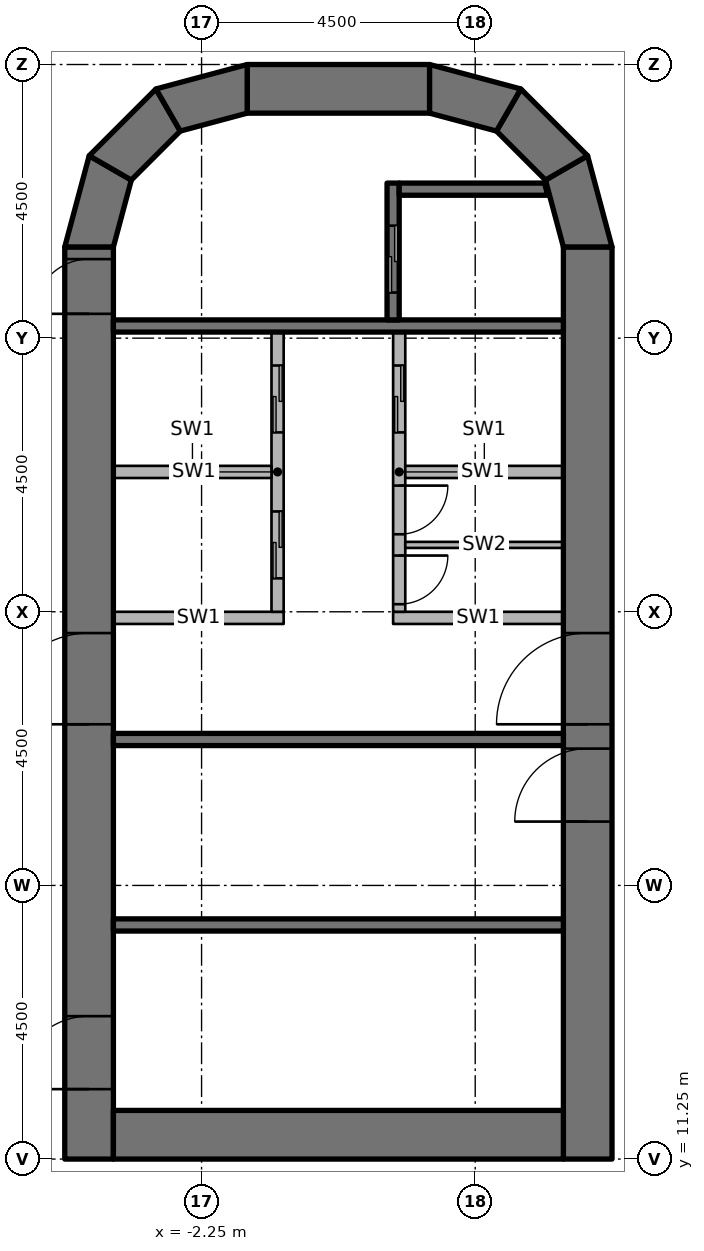
"""IFC4 building model, lengths in metres.
Left out: names, types, materials, properties, quantities, classifications, styles, units other than length and angle.
Written with IfcOpenShell. Run it as: python <this file> out.ifc"""

import sys

from ifc_helpers import new_model, si_unit, direction, frame, frame_2d, origin, place, context, subcontext, project, spatial, polyline, rectangle, outline, extrude, element, fill, save


model = new_model("IFC4")
c1 = context("Model", 3, precision=1e-05, world=origin(), true_north=direction((0.0, 1.0)))
c2 = subcontext(c1, "Body", "Model", "MODEL_VIEW")
j1 = project(units=[si_unit("LENGTHUNIT", "METRE"), si_unit("PLANEANGLEUNIT", "RADIAN")], contexts=[c1])
p1 = place(None, origin())
s1 = spatial("IfcSite", under=j1, at=p1, CompositionType="ELEMENT")
p2 = place(p1, origin())
s2 = spatial("IfcBuilding", under=s1, at=p2, CompositionType="ELEMENT")
p3 = place(p2, frame((0.0, 0.0, 136.0)))
s3 = spatial("IfcBuildingStorey", under=s2, at=p3, CompositionType="ELEMENT", Elevation=136.0)
p4 = place(p3, frame((-4.1, 11.25, 0.0), z_axis=(0.0, 0.0, 1.0), x_axis=(0.0, 1.0, 0.0)))
e1 = element("IfcWall", 1, at=p4, inside=s3, PredefinedType="SHEAR", context=c2, shape_type="SweptSolid", body=[
    extrude(rectangle(XDim=15.0, YDim=0.8, at=frame_2d((7.5, 0.0))), origin(), (0.0, 0.0, 1.0), 5.0),
])
p5 = place(p4, frame((7.15, 0.0, 0.0)))
e2 = element("IfcOpeningElement", 2, at=p5, cuts=e1, PredefinedType="OPENING", context=c2, shape_type="SweptSolid", body=[
    extrude(rectangle(XDim=1.5, YDim=2.3, at=frame_2d((0.75, 1.15))), frame((0.0, 0.41, 0.0), z_axis=(0.0, -1.0, 0.0), x_axis=(1.0, 0.0, 0.0)), (0.0, 0.0, 1.0), 0.82),
])
p6 = place(p4, frame((13.9, 0.0, 0.0)))
e3 = element("IfcOpeningElement", 3, at=p6, cuts=e1, PredefinedType="OPENING", context=c2, shape_type="SweptSolid", body=[
    extrude(rectangle(XDim=0.9, YDim=2.1, at=frame_2d((0.45, 1.05))), frame((0.0, 0.41, 0.0), z_axis=(0.0, -1.0, 0.0), x_axis=(1.0, 0.0, 0.0)), (0.0, 0.0, 1.0), 0.82),
])
p7 = place(p4, frame((1.15, 0.0, 0.0)))
e4 = element("IfcOpeningElement", 4, at=p7, cuts=e1, PredefinedType="OPENING", context=c2, shape_type="SweptSolid", body=[
    extrude(rectangle(XDim=1.2, YDim=2.1, at=frame_2d((0.6, 1.05))), frame((0.0, 0.41, 0.0), z_axis=(0.0, -1.0, 0.0), x_axis=(1.0, 0.0, 0.0)), (0.0, 0.0, 1.0), 0.82),
])
p8 = place(p3, frame((4.1, 11.25, 0.0), z_axis=(0.0, 0.0, 1.0), x_axis=(0.0, 1.0, 0.0)))
e5 = element("IfcWall", 5, at=p8, inside=s3, PredefinedType="SHEAR", context=c2, shape_type="SweptSolid", body=[
    extrude(rectangle(XDim=15.0, YDim=0.8, at=frame_2d((7.5, 0.0))), origin(), (0.0, 0.0, 1.0), 5.0),
])
p9 = place(p8, frame((7.15, 0.0, 0.0)))
e6 = element("IfcOpeningElement", 6, at=p9, cuts=e5, PredefinedType="OPENING", context=c2, shape_type="SweptSolid", body=[
    extrude(rectangle(XDim=1.5, YDim=2.3, at=frame_2d((0.75, 1.15))), frame((0.0, 0.41, 0.0), z_axis=(0.0, -1.0, 0.0), x_axis=(1.0, 0.0, 0.0)), (0.0, 0.0, 1.0), 0.82),
])
p10 = place(p8, frame((5.55, 0.0, 0.0)))
e7 = element("IfcOpeningElement", 7, at=p10, cuts=e5, PredefinedType="OPENING", context=c2, shape_type="SweptSolid", body=[
    extrude(rectangle(XDim=1.2, YDim=2.1, at=frame_2d((0.6, 1.05))), frame((0.0, 0.41, 0.0), z_axis=(0.0, -1.0, 0.0), x_axis=(1.0, 0.0, 0.0)), (0.0, 0.0, 1.0), 0.82),
])
p11 = place(p3, frame((-3.7, 11.65, 0.0), z_axis=(0.0, 0.0, 1.0), x_axis=(1.0, 0.0, 0.0)))
e8 = element("IfcWall", 8, at=p11, inside=s3, PredefinedType="SHEAR", context=c2, shape_type="SweptSolid", body=[
    extrude(rectangle(XDim=7.4, YDim=0.8, at=frame_2d((3.7, 0.0))), origin(), (0.0, 0.0, 1.0), 5.0),
])
p12 = place(p3, frame((-1.5, 28.85, 0.0), z_axis=(0.0, 0.0, 1.0), x_axis=(1.0, 0.0, 0.0)))
e9 = element("IfcWall", 9, at=p12, inside=s3, PredefinedType="SHEAR", context=c2, shape_type="SweptSolid", body=[
    extrude(rectangle(XDim=3.0, YDim=0.8, at=frame_2d((1.5, 0.0))), origin(), (0.0, 0.0, 1.0), 5.0),
])
p13 = place(p3, origin())
e10 = element("IfcWall", 10, at=p13, inside=s3, PredefinedType="SHEAR", context=c2, shape_type="SweptSolid", body=[
    extrude(outline(polyline([(-4.5, 26.25), (-4.098, 27.75), (-3.405, 27.35), (-3.7, 26.25), (-4.5, 26.25)])), origin(), (0.0, 0.0, 1.0), 5.0),
])
p14 = place(p3, origin())
e11 = element("IfcWall", 11, at=p14, inside=s3, PredefinedType="SHEAR", context=c2, shape_type="SweptSolid", body=[
    extrude(outline(polyline([(-4.098, 27.75), (-3.0, 28.848), (-2.6, 28.155), (-3.405, 27.35), (-4.098, 27.75)])), origin(), (0.0, 0.0, 1.0), 5.0),
])
p15 = place(p3, origin())
e12 = element("IfcWall", 12, at=p15, inside=s3, PredefinedType="SHEAR", context=c2, shape_type="SweptSolid", body=[
    extrude(outline(polyline([(-3.0, 28.848), (-1.5, 29.25), (-1.5, 28.45), (-2.6, 28.155), (-3.0, 28.848)])), origin(), (0.0, 0.0, 1.0), 5.0),
])
p16 = place(p3, origin())
e13 = element("IfcWall", 13, at=p16, inside=s3, PredefinedType="SHEAR", context=c2, shape_type="SweptSolid", body=[
    extrude(outline(polyline([(4.5, 26.25), (4.098, 27.75), (3.405, 27.35), (3.7, 26.25), (4.5, 26.25)])), origin(), (0.0, 0.0, 1.0), 5.0),
])
p17 = place(p3, origin())
e14 = element("IfcWall", 14, at=p17, inside=s3, PredefinedType="SHEAR", context=c2, shape_type="SweptSolid", body=[
    extrude(outline(polyline([(4.098, 27.75), (3.0, 28.848), (2.6, 28.155), (3.405, 27.35), (4.098, 27.75)])), origin(), (0.0, 0.0, 1.0), 5.0),
])
p18 = place(p3, origin())
e15 = element("IfcWall", 15, at=p18, inside=s3, PredefinedType="SHEAR", context=c2, shape_type="SweptSolid", body=[
    extrude(outline(polyline([(3.0, 28.848), (1.5, 29.25), (1.5, 28.45), (2.6, 28.155), (3.0, 28.848)])), origin(), (0.0, 0.0, 1.0), 5.0),
])
p19 = place(p3, origin())
e16 = element("IfcWall", 16, at=p19, inside=s3, PredefinedType="SOLIDWALL", context=c2, shape_type="SweptSolid", body=[
    extrude(outline(polyline([(6.129, 29.24), (4.49, 30.879), (4.386, 30.7), (5.95, 29.136), (6.129, 29.24)])), origin(), (0.0, 0.0, 1.0), 4.85),
])
p20 = place(p3, origin())
e17 = element("IfcWall", 17, at=p20, inside=s3, PredefinedType="SOLIDWALL", context=c2, shape_type="SweptSolid", body=[
    extrude(outline(polyline([(-4.49, 30.879), (-6.129, 29.24), (-5.95, 29.136), (-4.386, 30.7), (-4.49, 30.879)])), origin(), (0.0, 0.0, 1.0), 4.85),
])
p21 = place(p3, frame((-3.7, 24.95, 0.0), z_axis=(0.0, 0.0, 1.0), x_axis=(1.0, 0.0, 0.0)))
e18 = element("IfcWall", 18, at=p21, inside=s3, PredefinedType="SHEAR", context=c2, shape_type="SweptSolid", body=[
    extrude(rectangle(XDim=7.4, YDim=0.2, at=frame_2d((3.7, 0.0))), origin(), (0.0, 0.0, 1.0), 4.85),
])
p22 = place(p3, frame((0.9, 27.3, 0.0), z_axis=(0.0, 0.0, 1.0), x_axis=(0.0, -1.0, 0.0)))
e19 = element("IfcWall", 19, at=p22, inside=s3, PredefinedType="SHEAR", context=c2, shape_type="SweptSolid", body=[
    extrude(rectangle(XDim=2.25, YDim=0.2, at=frame_2d((1.125, 0.0))), origin(), (0.0, 0.0, 1.0), 4.85),
])
p23 = place(p22, frame((0.7, 0.0, 0.0)))
e20 = element("IfcOpeningElement", 20, at=p23, cuts=e19, PredefinedType="OPENING", context=c2, shape_type="SweptSolid", body=[
    extrude(rectangle(XDim=1.1, YDim=2.3, at=frame_2d((0.55, 1.15))), frame((0.0, 0.11, 0.0), z_axis=(0.0, -1.0, 0.0), x_axis=(1.0, 0.0, 0.0)), (0.0, 0.0, 1.0), 0.22),
])
p24 = place(p3, origin())
e21 = element("IfcWall", 21, at=p24, inside=s3, PredefinedType="SHEAR", context=c2, shape_type="SweptSolid", body=[
    extrude(outline(polyline([(1.0, 27.1), (3.444, 27.1), (3.39, 27.3), (1.0, 27.3), (1.0, 27.1)])), origin(), (0.0, 0.0, 1.0), 4.85),
])
for number, where, z_axis, x_axis in (
    (22, (-3.7, 18.15, 0.0), (0.0, 0.0, 1.0), (1.0, 0.0, 0.0)),
    (23, (-3.7, 15.1, 0.0), (0.0, 0.0, 1.0), (1.0, 0.0, 0.0)),
):
    element("IfcWall", number, at=place(p3, frame(where, z_axis=z_axis, x_axis=x_axis)), inside=s3, PredefinedType="SHEAR", context=c2, shape_type="SweptSolid", body=[
        extrude(rectangle(XDim=7.4, YDim=0.2, at=frame_2d((3.7, 0.0))), origin(), (0.0, 0.0, 1.0), 4.85),
    ])
p25 = place(p3, frame((-3.7, 20.15, 0.0), z_axis=(0.0, 0.0, 1.0), x_axis=(1.0, 0.0, 0.0)))
e24 = element("IfcWall", 24, at=p25, inside=s3, PredefinedType="PARTITIONING", context=c2, shape_type="SweptSolid", body=[
    extrude(rectangle(XDim=2.8, YDim=0.2, at=frame_2d((1.4, 0.0))), origin(), (0.0, 0.0, 1.0), 4.85),
])
p26 = place(p3, frame((-1.0, 24.85, 0.0), z_axis=(0.0, 0.0, 1.0), x_axis=(0.0, -1.0, 0.0)))
e25 = element("IfcWall", 25, at=p26, inside=s3, PredefinedType="PARTITIONING", context=c2, shape_type="SweptSolid", body=[
    extrude(rectangle(XDim=4.6, YDim=0.2, at=frame_2d((2.3, 0.0))), origin(), (0.0, 0.0, 1.0), 4.85),
])
p27 = place(p26, frame((0.55, 0.0, 0.0)))
e26 = element("IfcOpeningElement", 26, at=p27, cuts=e25, PredefinedType="OPENING", context=c2, shape_type="SweptSolid", body=[
    extrude(rectangle(XDim=1.1, YDim=2.3, at=frame_2d((0.55, 1.15))), frame((0.0, 0.11, 0.0), z_axis=(0.0, -1.0, 0.0), x_axis=(1.0, 0.0, 0.0)), (0.0, 0.0, 1.0), 0.22),
])
p28 = place(p26, frame((2.95, 0.0, 0.0)))
e27 = element("IfcOpeningElement", 27, at=p28, cuts=e25, PredefinedType="OPENING", context=c2, shape_type="SweptSolid", body=[
    extrude(rectangle(XDim=1.1, YDim=2.3, at=frame_2d((0.55, 1.15))), frame((0.0, 0.11, 0.0), z_axis=(0.0, -1.0, 0.0), x_axis=(1.0, 0.0, 0.0)), (0.0, 0.0, 1.0), 0.22),
])
p29 = place(p3, frame((0.9, 20.15, 0.0), z_axis=(0.0, 0.0, 1.0), x_axis=(1.0, 0.0, 0.0)))
e28 = element("IfcWall", 28, at=p29, inside=s3, PredefinedType="PARTITIONING", context=c2, shape_type="SweptSolid", body=[
    extrude(rectangle(XDim=2.8, YDim=0.2, at=frame_2d((1.4, 0.0))), origin(), (0.0, 0.0, 1.0), 4.85),
])
p30 = place(p3, frame((1.0, 24.85, 0.0), z_axis=(0.0, 0.0, 1.0), x_axis=(0.0, -1.0, 0.0)))
e29 = element("IfcWall", 29, at=p30, inside=s3, PredefinedType="PARTITIONING", context=c2, shape_type="SweptSolid", body=[
    extrude(rectangle(XDim=4.6, YDim=0.2, at=frame_2d((2.3, 0.0))), origin(), (0.0, 0.0, 1.0), 4.85),
])
p31 = place(p30, frame((0.55, 0.0, 0.0)))
e30 = element("IfcOpeningElement", 30, at=p31, cuts=e29, PredefinedType="OPENING", context=c2, shape_type="SweptSolid", body=[
    extrude(rectangle(XDim=1.1, YDim=2.3, at=frame_2d((0.55, 1.15))), frame((0.0, 0.11, 0.0), z_axis=(0.0, -1.0, 0.0), x_axis=(1.0, 0.0, 0.0)), (0.0, 0.0, 1.0), 0.22),
])
p32 = place(p30, frame((2.525, 0.0, 0.0)))
e31 = element("IfcOpeningElement", 31, at=p32, cuts=e29, PredefinedType="OPENING", context=c2, shape_type="SweptSolid", body=[
    extrude(rectangle(XDim=0.8, YDim=2.1, at=frame_2d((0.4, 1.05))), frame((0.0, 0.11, 0.0), z_axis=(0.0, -1.0, 0.0), x_axis=(1.0, 0.0, 0.0)), (0.0, 0.0, 1.0), 0.22),
])
p33 = place(p30, frame((3.675, 0.0, 0.0)))
e32 = element("IfcOpeningElement", 32, at=p33, cuts=e29, PredefinedType="OPENING", context=c2, shape_type="SweptSolid", body=[
    extrude(rectangle(XDim=0.8, YDim=2.1, at=frame_2d((0.4, 1.05))), frame((0.0, 0.11, 0.0), z_axis=(0.0, -1.0, 0.0), x_axis=(1.0, 0.0, 0.0)), (0.0, 0.0, 1.0), 0.22),
])
for number, where, z_axis, x_axis in (
    (33, (-3.7, 22.55, 0.0), (0.0, 0.0, 1.0), (1.0, 0.0, 0.0)),
    (34, (1.1, 22.55, 0.0), (0.0, 0.0, 1.0), (1.0, 0.0, 0.0)),
):
    element("IfcWall", number, at=place(p3, frame(where, z_axis=z_axis, x_axis=x_axis)), inside=s3, PredefinedType="PARTITIONING", context=c2, shape_type="SweptSolid", body=[
        extrude(rectangle(XDim=2.6, YDim=0.2, at=frame_2d((1.3, 0.0))), origin(), (0.0, 0.0, 1.0), 4.85),
    ])
p34 = place(p3, frame((1.1, 21.35, 0.0), z_axis=(0.0, 0.0, 1.0), x_axis=(1.0, 0.0, 0.0)))
e35 = element("IfcWall", 35, at=p34, inside=s3, PredefinedType="PARTITIONING", context=c2, shape_type="SweptSolid", body=[
    extrude(rectangle(XDim=2.6, YDim=0.1, at=frame_2d((1.3, 0.0))), origin(), (0.0, 0.0, 1.0), 4.85),
])
p35 = place(p5, origin())
e36 = element("IfcDoor", 36, at=p35, inside=s3, OperationType="DOUBLE_DOOR_SINGLE_SWING", PredefinedType="DOOR", context=c2, shape_type="SweptSolid", body=[
    extrude(rectangle(XDim=1.5, YDim=2.3, at=frame_2d((0.75, 1.15))), frame((0.0, 0.025, 0.0), z_axis=(0.0, -1.0, 0.0), x_axis=(1.0, 0.0, 0.0)), (0.0, 0.0, 1.0), 0.05),
])
fill(e2, e36)
p36 = place(p9, origin())
e37 = element("IfcDoor", 37, at=p36, inside=s3, OperationType="DOUBLE_DOOR_SINGLE_SWING", PredefinedType="DOOR", context=c2, shape_type="SweptSolid", body=[
    extrude(rectangle(XDim=1.5, YDim=2.3, at=frame_2d((0.75, 1.15))), frame((0.0, 0.025, 0.0), z_axis=(0.0, -1.0, 0.0), x_axis=(1.0, 0.0, 0.0)), (0.0, 0.0, 1.0), 0.05),
])
fill(e6, e37)
p37 = place(p6, origin())
e38 = element("IfcDoor", 38, at=p37, inside=s3, OperationType="SINGLE_SWING_RIGHT", PredefinedType="DOOR", context=c2, shape_type="SweptSolid", body=[
    extrude(rectangle(XDim=0.9, YDim=2.1, at=frame_2d((0.45, 1.05))), frame((0.0, 0.025, 0.0), z_axis=(0.0, -1.0, 0.0), x_axis=(1.0, 0.0, 0.0)), (0.0, 0.0, 1.0), 0.05),
])
fill(e3, e38)
p38 = place(p10, origin())
e39 = element("IfcDoor", 39, at=p38, inside=s3, OperationType="SINGLE_SWING_LEFT", PredefinedType="DOOR", context=c2, shape_type="SweptSolid", body=[
    extrude(rectangle(XDim=1.2, YDim=2.1, at=frame_2d((0.6, 1.05))), frame((0.0, 0.025, 0.0), z_axis=(0.0, -1.0, 0.0), x_axis=(1.0, 0.0, 0.0)), (0.0, 0.0, 1.0), 0.05),
])
fill(e7, e39)
p39 = place(p7, origin())
e40 = element("IfcDoor", 40, at=p39, inside=s3, OperationType="SINGLE_SWING_LEFT", PredefinedType="DOOR", context=c2, shape_type="SweptSolid", body=[
    extrude(rectangle(XDim=1.2, YDim=2.1, at=frame_2d((0.6, 1.05))), frame((0.0, 0.025, 0.0), z_axis=(0.0, -1.0, 0.0), x_axis=(1.0, 0.0, 0.0)), (0.0, 0.0, 1.0), 0.05),
])
fill(e4, e40)
p40 = place(p23, origin())
e41 = element("IfcDoor", 41, at=p40, inside=s3, OperationType="DOUBLE_DOOR_SLIDING", PredefinedType="DOOR", context=c2, shape_type="SweptSolid", body=[
    extrude(rectangle(XDim=1.1, YDim=2.3, at=frame_2d((0.55, 1.15))), frame((0.0, 0.025, 0.0), z_axis=(0.0, -1.0, 0.0), x_axis=(1.0, 0.0, 0.0)), (0.0, 0.0, 1.0), 0.05),
])
fill(e20, e41)
p41 = place(p27, origin())
e42 = element("IfcDoor", 42, at=p41, inside=s3, OperationType="DOUBLE_DOOR_SLIDING", PredefinedType="DOOR", context=c2, shape_type="SweptSolid", body=[
    extrude(rectangle(XDim=1.1, YDim=2.3, at=frame_2d((0.55, 1.15))), frame((0.0, 0.025, 0.0), z_axis=(0.0, -1.0, 0.0), x_axis=(1.0, 0.0, 0.0)), (0.0, 0.0, 1.0), 0.05),
])
fill(e26, e42)
p42 = place(p28, origin())
e43 = element("IfcDoor", 43, at=p42, inside=s3, OperationType="DOUBLE_DOOR_SLIDING", PredefinedType="DOOR", context=c2, shape_type="SweptSolid", body=[
    extrude(rectangle(XDim=1.1, YDim=2.3, at=frame_2d((0.55, 1.15))), frame((0.0, 0.025, 0.0), z_axis=(0.0, -1.0, 0.0), x_axis=(1.0, 0.0, 0.0)), (0.0, 0.0, 1.0), 0.05),
])
fill(e27, e43)
p43 = place(p31, origin())
e44 = element("IfcDoor", 44, at=p43, inside=s3, OperationType="DOUBLE_DOOR_SLIDING", PredefinedType="DOOR", context=c2, shape_type="SweptSolid", body=[
    extrude(rectangle(XDim=1.1, YDim=2.3, at=frame_2d((0.55, 1.15))), frame((0.0, 0.025, 0.0), z_axis=(0.0, -1.0, 0.0), x_axis=(1.0, 0.0, 0.0)), (0.0, 0.0, 1.0), 0.05),
])
fill(e30, e44)
p44 = place(p32, origin())
e45 = element("IfcDoor", 45, at=p44, inside=s3, OperationType="SINGLE_SWING_LEFT", PredefinedType="DOOR", context=c2, shape_type="SweptSolid", body=[
    extrude(rectangle(XDim=0.8, YDim=2.1, at=frame_2d((0.4, 1.05))), frame((0.0, 0.025, 0.0), z_axis=(0.0, -1.0, 0.0), x_axis=(1.0, 0.0, 0.0)), (0.0, 0.0, 1.0), 0.05),
])
fill(e31, e45)
p45 = place(p33, origin())
e46 = element("IfcDoor", 46, at=p45, inside=s3, OperationType="SINGLE_SWING_LEFT", PredefinedType="DOOR", context=c2, shape_type="SweptSolid", body=[
    extrude(rectangle(XDim=0.8, YDim=2.1, at=frame_2d((0.4, 1.05))), frame((0.0, 0.025, 0.0), z_axis=(0.0, -1.0, 0.0), x_axis=(1.0, 0.0, 0.0)), (0.0, 0.0, 1.0), 0.05),
])
fill(e32, e46)
save(model, sys.argv[1])
